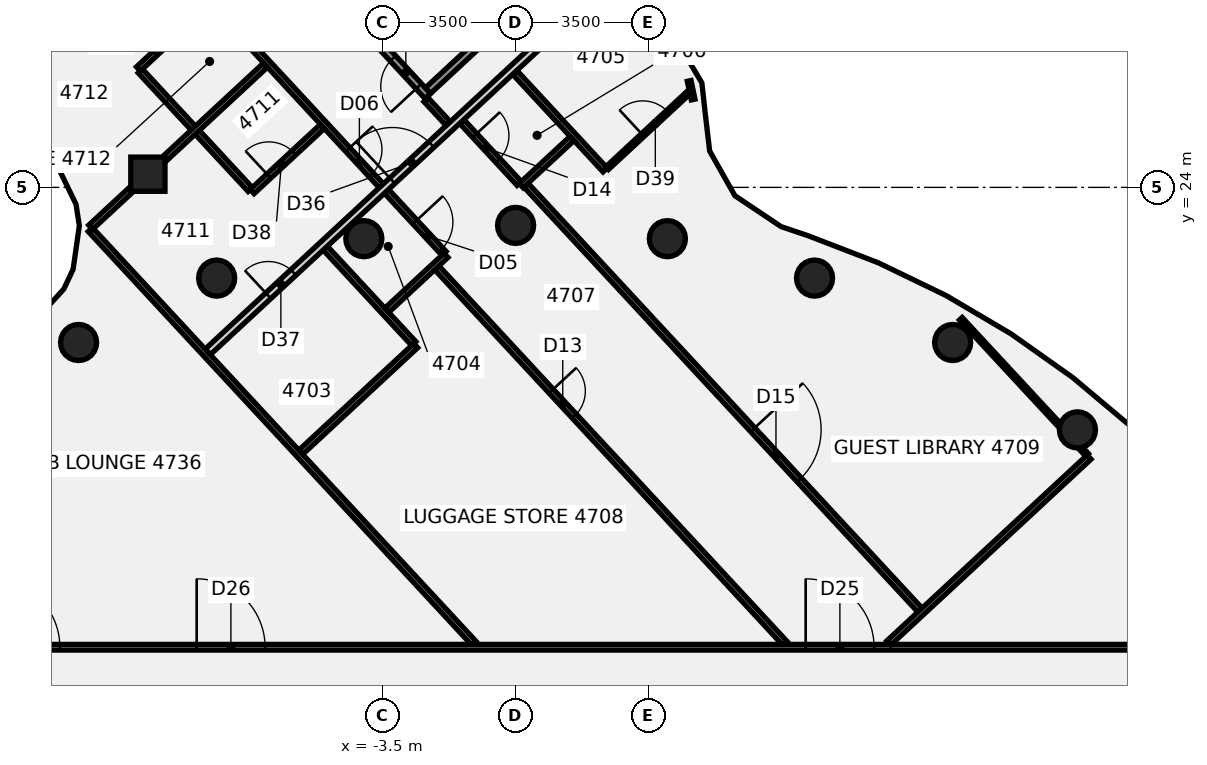
"""IFC4 building model, lengths in metres.
Left out: names, types, materials, properties, quantities, classifications, styles, units other than length and angle.
Written with IfcOpenShell. Run it as: python <this file> out.ifc"""

import sys

from ifc_helpers import new_model, si_unit, direction, frame, frame_2d, origin, origin_2d, place, context, subcontext, project, spatial, rectangle, circle, extrude, element, fill, save


model = new_model("IFC4")
c1 = context("Model", 3, precision=1e-05, world=origin(), true_north=direction((0.0, 1.0)))
c2 = subcontext(c1, "Body", "Model", "MODEL_VIEW")
j1 = project(units=[si_unit("LENGTHUNIT", "METRE"), si_unit("PLANEANGLEUNIT", "RADIAN")], contexts=[c1])
p1 = place(None, origin())
s1 = spatial("IfcSite", under=j1, at=p1, CompositionType="ELEMENT")
p2 = place(p1, origin())
s2 = spatial("IfcBuilding", under=s1, at=p2, CompositionType="ELEMENT")
p3 = place(p2, frame((0.0, 0.0, 189.7)))
s3 = spatial("IfcBuildingStorey", under=s2, at=p3, CompositionType="ELEMENT", Elevation=189.7)
for number, where, z_axis, x_axis in (
    (1, (14.784, 17.619, -0.14), (0.0, 0.0, 1.0), (1.0, 0.0, 0.0)),
    (2, (11.5, 19.919, -0.14), (0.0, 0.0, 1.0), (1.0, 0.0, 0.0)),
    (3, (7.866, 21.613, -0.14), (0.0, 0.0, 1.0), (1.0, 0.0, 0.0)),
    (4, (3.994, 22.651, -0.14), (0.0, 0.0, 1.0), (1.0, 0.0, 0.0)),
    (5, (0.0, 23.0, -0.14), (0.0, 0.0, 1.0), (1.0, 0.0, 0.0)),
    (6, (-3.994, 22.651, -0.14), (0.0, 0.0, 1.0), (1.0, 0.0, 0.0)),
    (7, (-7.866, 21.613, -0.14), (0.0, 0.0, 1.0), (1.0, 0.0, 0.0)),
    (8, (-11.5, 19.919, -0.14), (0.0, 0.0, 1.0), (1.0, 0.0, 0.0)),
):
    element("IfcColumn", number, at=place(p3, frame(where, z_axis=z_axis, x_axis=x_axis)), inside=s3, PredefinedType="COLUMN", context=c2, shape_type="SweptSolid", body=[
        extrude(circle(Radius=0.475, at=origin_2d()), origin(), (0.0, 0.0, 1.0), 3.6),
    ])
p4 = place(p3, frame((-9.677, 24.347, -0.139), z_axis=(-0.011386986819, -0.049004711131, 0.99873363557), x_axis=(0.732712476675, 0.679260584893, 0.041683142108)))
e9 = element("IfcColumn", 9, at=p4, inside=s3, PredefinedType="COLUMN", context=c2, shape_type="SweptSolid", body=[
    extrude(rectangle(XDim=0.9, YDim=0.9, at=origin_2d()), origin(), (0.0, 0.0, 1.0), 3.602),
])
p5 = place(p3, frame((-9.874, 27.062, 0.0), z_axis=(0.0, 0.0, 1.0), x_axis=(0.679983920545, -0.73322702337, 0.0)))
e10 = element("IfcWall", 10, at=p5, inside=s3, PredefinedType="PARTITIONING", context=c2, shape_type="SweptSolid", body=[
    extrude(rectangle(XDim=4.251, YDim=0.15, at=frame_2d((2.125, 0.0))), origin(), (0.0, 0.0, 1.0), 2.864),
])
p6 = place(p3, frame((-12.588, 33.811, 0.0), z_axis=(0.0, 0.0, 1.0), x_axis=(0.6797793132, -0.733416720116, 0.0)))
e11 = element("IfcWall", 11, at=p6, inside=s3, PredefinedType="PARTITIONING", context=c2, shape_type="SweptSolid", body=[
    extrude(rectangle(XDim=15.744, YDim=0.15, at=frame_2d((7.872, 0.0))), origin(), (0.0, 0.0, 1.0), 2.864),
])
p7 = place(p6, frame((14.619, 0.0, 0.0)))
e12 = element("IfcOpeningElement", 12, at=p7, cuts=e11, PredefinedType="OPENING", context=c2, shape_type="SweptSolid", body=[
    extrude(rectangle(XDim=1.0, YDim=2.1, at=frame_2d((0.5, 1.05))), frame((0.0, 0.085, 0.0), z_axis=(0.0, -1.0, 0.0), x_axis=(1.0, 0.0, 0.0)), (0.0, 0.0, 1.0), 0.17),
])
p8 = place(p6, frame((12.02, 0.0, 0.0)))
e13 = element("IfcOpeningElement", 13, at=p8, cuts=e11, PredefinedType="OPENING", context=c2, shape_type="SweptSolid", body=[
    extrude(rectangle(XDim=0.9, YDim=2.1, at=frame_2d((0.45, 1.05))), frame((0.0, 0.085, 0.0), z_axis=(0.0, -1.0, 0.0), x_axis=(1.0, 0.0, 0.0)), (0.0, 0.0, 1.0), 0.17),
])
p9 = place(p6, frame((5.32, 0.0, 0.0)))
e14 = element("IfcOpeningElement", 14, at=p9, cuts=e11, PredefinedType="OPENING", context=c2, shape_type="SweptSolid", body=[
    extrude(rectangle(XDim=0.9, YDim=2.1, at=frame_2d((0.45, 1.05))), frame((0.0, 0.085, 0.0), z_axis=(0.0, -1.0, 0.0), x_axis=(1.0, 0.0, 0.0)), (0.0, 0.0, 1.0), 0.17),
])
p10 = place(p6, frame((3.019, 0.0, 0.0)))
e15 = element("IfcOpeningElement", 15, at=p10, cuts=e11, PredefinedType="OPENING", context=c2, shape_type="SweptSolid", body=[
    extrude(rectangle(XDim=0.9, YDim=2.1, at=frame_2d((0.45, 1.05))), frame((0.0, 0.085, 0.0), z_axis=(0.0, -1.0, 0.0), x_axis=(1.0, 0.0, 0.0)), (0.0, 0.0, 1.0), 0.17),
])
p11 = place(p3, frame((-11.19, 22.89, 0.0), z_axis=(0.0, 0.0, 1.0), x_axis=(0.679949372444, -0.733259061255, 0.0)))
e16 = element("IfcWall", 16, at=p11, inside=s3, PredefinedType="PARTITIONING", context=c2, shape_type="SweptSolid", body=[
    extrude(rectangle(XDim=14.843, YDim=0.15, at=frame_2d((7.421, 0.0))), origin(), (0.0, 0.0, 1.0), 2.864),
])
p12 = place(p3, frame((-2.356, 26.306, 0.0), z_axis=(0.0, 0.0, 1.0), x_axis=(0.679848592059, -0.733352501785, 0.0)))
e17 = element("IfcWall", 17, at=p12, inside=s3, PredefinedType="PARTITIONING", context=c2, shape_type="SweptSolid", body=[
    extrude(rectangle(XDim=0.84, YDim=0.15, at=frame_2d((0.42, 0.0))), origin(), (0.0, 0.0, 1.0), 2.864),
])
p13 = place(p3, frame((-5.009, 22.402, 0.0), z_axis=(0.0, 0.0, 1.0), x_axis=(0.679947924825, -0.733260403627, 0.0)))
e18 = element("IfcWall", 18, at=p13, inside=s3, PredefinedType="PARTITIONING", context=c2, shape_type="SweptSolid", body=[
    extrude(rectangle(XDim=3.425, YDim=0.15, at=frame_2d((1.713, 0.0))), origin(), (0.0, 0.0, 1.0), 2.864),
])
p14 = place(p3, frame((-2.071, 21.88, 0.0), z_axis=(0.0, 0.0, 1.0), x_axis=(0.679904289686, -0.733300863811, 0.0)))
e19 = element("IfcWall", 19, at=p14, inside=s3, PredefinedType="PARTITIONING", context=c2, shape_type="SweptSolid", body=[
    extrude(rectangle(XDim=13.465, YDim=0.15, at=frame_2d((6.732, 0.0))), origin(), (0.0, 0.0, 1.0), 2.864),
])
p15 = place(p14, frame((4.42, 0.0, 0.0)))
e20 = element("IfcOpeningElement", 20, at=p15, cuts=e19, PredefinedType="OPENING", context=c2, shape_type="SweptSolid", body=[
    extrude(rectangle(XDim=0.9, YDim=2.1, at=frame_2d((0.45, 1.05))), frame((0.0, 0.085, 0.0), z_axis=(0.0, -1.0, 0.0), x_axis=(1.0, 0.0, 0.0)), (0.0, 0.0, 1.0), 0.17),
])
p16 = place(p3, frame((-1.416, 25.733, 0.0), z_axis=(0.0, 0.0, 1.0), x_axis=(0.679936338433, -0.733271147448, 0.0)))
e21 = element("IfcWall", 21, at=p16, inside=s3, PredefinedType="PARTITIONING", context=c2, shape_type="SweptSolid", body=[
    extrude(rectangle(XDim=2.22, YDim=0.15, at=frame_2d((1.11, 0.0))), origin(), (0.0, 0.0, 1.0), 2.864),
])
p17 = place(p16, frame((0.5, 0.0, 0.0)))
e22 = element("IfcOpeningElement", 22, at=p17, cuts=e21, PredefinedType="OPENING", context=c2, shape_type="SweptSolid", body=[
    extrude(rectangle(XDim=0.9, YDim=2.1, at=frame_2d((0.45, 1.05))), frame((0.0, 0.085, 0.0), z_axis=(0.0, -1.0, 0.0), x_axis=(1.0, 0.0, 0.0)), (0.0, 0.0, 1.0), 0.17),
])
p18 = place(p3, frame((-0.022, 27.025, 0.0), z_axis=(0.0, 0.0, 1.0), x_axis=(0.679701507536, -0.7334888279, 0.0)))
e23 = element("IfcWall", 23, at=p18, inside=s3, PredefinedType="PARTITIONING", context=c2, shape_type="SweptSolid", body=[
    extrude(rectangle(XDim=3.5, YDim=0.15, at=frame_2d((1.75, 0.0))), origin(), (0.0, 0.0, 1.0), 2.864),
])
p19 = place(p3, frame((0.276, 24.055, 0.0), z_axis=(0.0, 0.0, 1.0), x_axis=(0.67991262492, -0.733293135434, 0.0)))
e24 = element("IfcWall", 24, at=p19, inside=s3, PredefinedType="PARTITIONING", context=c2, shape_type="SweptSolid", body=[
    extrude(rectangle(XDim=15.239, YDim=0.15, at=frame_2d((7.62, 0.0))), origin(), (0.0, 0.0, 1.0), 2.864),
])
p20 = place(p19, frame((8.77, 0.0, 0.0)))
e25 = element("IfcOpeningElement", 25, at=p20, cuts=e24, PredefinedType="OPENING", context=c2, shape_type="SweptSolid", body=[
    extrude(rectangle(XDim=1.8, YDim=2.1, at=frame_2d((0.9, 1.05))), frame((0.0, 0.085, 0.0), z_axis=(0.0, -1.0, 0.0), x_axis=(1.0, 0.0, 0.0)), (0.0, 0.0, 1.0), 0.17),
])
p21 = place(p3, frame((11.715, 20.542, 0.0), z_axis=(0.0, 0.0, 1.0), x_axis=(0.679978080858, -0.733232438966, 0.0)))
e26 = element("IfcWall", 26, at=p21, inside=s3, PredefinedType="PARTITIONING", context=c2, shape_type="SweptSolid", body=[
    extrude(rectangle(XDim=3.842, YDim=0.1, at=frame_2d((1.921, 0.0))), origin(), (0.0, 0.0, 1.0), 2.864),
])
p22 = place(p3, frame((14.858, 17.154, 0.0), z_axis=(0.0, 0.0, 1.0), x_axis=(0.679849378898, -0.733351772352, 0.0)))
e27 = element("IfcWall", 27, at=p22, inside=s3, PredefinedType="PARTITIONING", context=c2, shape_type="SweptSolid", body=[
    extrude(rectangle(XDim=0.265, YDim=0.1, at=frame_2d((0.132, 0.0))), origin(), (0.0, 0.0, 1.0), 2.864),
])
p23 = place(p3, frame((-17.065, 11.9, 0.0), z_axis=(0.0, 0.0, 1.0), x_axis=(1.0, 0.0, 0.0)))
e28 = element("IfcWall", 28, at=p23, inside=s3, PredefinedType="PARTITIONING", context=c2, shape_type="SweptSolid", body=[
    extrude(rectangle(XDim=34.165, YDim=0.15, at=frame_2d((17.083, 0.0))), origin(), (0.0, 0.0, 1.0), 2.864),
])
p24 = place(p23, frame((24.698, 0.0, 0.0)))
e29 = element("IfcOpeningElement", 29, at=p24, cuts=e28, PredefinedType="OPENING", context=c2, shape_type="SweptSolid", body=[
    extrude(rectangle(XDim=1.8, YDim=2.1, at=frame_2d((0.9, 1.05))), frame((0.0, 0.085, 0.0), z_axis=(0.0, -1.0, 0.0), x_axis=(1.0, 0.0, 0.0)), (0.0, 0.0, 1.0), 0.17),
])
p25 = place(p23, frame((8.673, 0.0, 0.0)))
e30 = element("IfcOpeningElement", 30, at=p25, cuts=e28, PredefinedType="OPENING", context=c2, shape_type="SweptSolid", body=[
    extrude(rectangle(XDim=1.8, YDim=2.1, at=frame_2d((0.9, 1.05))), frame((0.0, 0.085, 0.0), z_axis=(0.0, -1.0, 0.0), x_axis=(1.0, 0.0, 0.0)), (0.0, 0.0, 1.0), 0.17),
])
p26 = place(p23, frame((3.273, 0.0, 0.0)))
e31 = element("IfcOpeningElement", 31, at=p26, cuts=e28, PredefinedType="OPENING", context=c2, shape_type="SweptSolid", body=[
    extrude(rectangle(XDim=1.8, YDim=2.1, at=frame_2d((0.9, 1.05))), frame((0.0, 0.085, 0.0), z_axis=(0.0, -1.0, 0.0), x_axis=(1.0, 0.0, 0.0)), (0.0, 0.0, 1.0), 0.17),
])
p27 = place(p3, frame((-13.64, 26.808, 0.0), z_axis=(0.0, 0.0, 1.0), x_axis=(0.733242994102, 0.67996669889, 0.0)))
e32 = element("IfcWall", 32, at=p27, inside=s3, PredefinedType="PARTITIONING", context=c2, shape_type="SweptSolid", body=[
    extrude(rectangle(XDim=5.453, YDim=0.15, at=frame_2d((2.727, 0.0))), origin(), (0.0, 0.0, 1.0), 2.864),
])
p28 = place(p3, frame((-11.181, 22.952, 0.0), z_axis=(0.0, 0.0, 1.0), x_axis=(0.733245156738, 0.679964366802, 0.0)))
e33 = element("IfcWall", 33, at=p28, inside=s3, PredefinedType="PARTITIONING", context=c2, shape_type="SweptSolid", body=[
    extrude(rectangle(XDim=1.443, YDim=0.15, at=frame_2d((0.722, 0.0))), origin(), (0.0, 0.0, 1.0), 2.864),
])
p29 = place(p3, frame((-9.343, 24.656, 0.0), z_axis=(0.0, 0.0, 1.0), x_axis=(0.733222895543, 0.679988371556, 0.0)))
e34 = element("IfcWall", 34, at=p29, inside=s3, PredefinedType="PARTITIONING", context=c2, shape_type="SweptSolid", body=[
    extrude(rectangle(XDim=3.765, YDim=0.15, at=frame_2d((1.883, 0.0))), origin(), (0.0, 0.0, 1.0), 2.864),
])
p30 = place(p3, frame((-9.926, 27.116, 0.0), z_axis=(0.0, 0.0, 1.0), x_axis=(0.733334885153, 0.679867594623, 0.0)))
e35 = element("IfcWall", 35, at=p30, inside=s3, PredefinedType="PARTITIONING", context=c2, shape_type="SweptSolid", body=[
    extrude(rectangle(XDim=2.521, YDim=0.15, at=frame_2d((1.26, 0.0))), origin(), (0.0, 0.0, 1.0), 2.864),
])
p31 = place(p30, frame((0.6, 0.0, 0.0)))
e36 = element("IfcOpeningElement", 36, at=p31, cuts=e35, PredefinedType="OPENING", context=c2, shape_type="SweptSolid", body=[
    extrude(rectangle(XDim=0.9, YDim=2.1, at=frame_2d((0.45, 1.05))), frame((0.0, 0.085, 0.0), z_axis=(0.0, -1.0, 0.0), x_axis=(1.0, 0.0, 0.0)), (0.0, 0.0, 1.0), 0.17),
])
p32 = place(p3, frame((-8.098, 19.673, 0.0), z_axis=(0.0, 0.0, 1.0), x_axis=(0.733267845556, 0.67993989931, 0.0)))
e37 = element("IfcWall", 37, at=p32, inside=s3, PredefinedType="PARTITIONING", context=c2, shape_type="SweptSolid", body=[
    extrude(rectangle(XDim=14.219, YDim=0.2, at=frame_2d((7.11, 0.0))), origin(), (0.0, 0.0, 1.0), 2.864),
])
p33 = place(p32, frame((6.62, 0.0, 0.0)))
e38 = element("IfcOpeningElement", 38, at=p33, cuts=e37, PredefinedType="OPENING", context=c2, shape_type="SweptSolid", body=[
    extrude(rectangle(XDim=1.4, YDim=2.1, at=frame_2d((0.7, 1.05))), frame((0.0, 0.11, 0.0), z_axis=(0.0, -1.0, 0.0), x_axis=(1.0, 0.0, 0.0)), (0.0, 0.0, 1.0), 0.22),
])
p34 = place(p32, frame((2.17, 0.0, 0.0)))
e39 = element("IfcOpeningElement", 39, at=p34, cuts=e37, PredefinedType="OPENING", context=c2, shape_type="SweptSolid", body=[
    extrude(rectangle(XDim=0.9, YDim=2.1, at=frame_2d((0.45, 1.05))), frame((0.0, 0.11, 0.0), z_axis=(0.0, -1.0, 0.0), x_axis=(1.0, 0.0, 0.0)), (0.0, 0.0, 1.0), 0.22),
])
p35 = place(p3, frame((-6.934, 23.889, 0.0), z_axis=(0.0, 0.0, 1.0), x_axis=(0.733334885153, 0.679867594623, 0.0)))
e40 = element("IfcWall", 40, at=p35, inside=s3, PredefinedType="PARTITIONING", context=c2, shape_type="SweptSolid", body=[
    extrude(rectangle(XDim=2.521, YDim=0.15, at=frame_2d((1.26, 0.0))), origin(), (0.0, 0.0, 1.0), 2.864),
])
p36 = place(p35, frame((0.6, 0.0, 0.0)))
e41 = element("IfcOpeningElement", 41, at=p36, cuts=e40, PredefinedType="OPENING", context=c2, shape_type="SweptSolid", body=[
    extrude(rectangle(XDim=0.9, YDim=2.1, at=frame_2d((0.45, 1.05))), frame((0.0, 0.085, 0.0), z_axis=(0.0, -1.0, 0.0), x_axis=(1.0, 0.0, 0.0)), (0.0, 0.0, 1.0), 0.17),
])
p37 = place(p3, frame((-5.65, 17.033, 0.0), z_axis=(0.0, 0.0, 1.0), x_axis=(0.733295549229, 0.679910021607, 0.0)))
e42 = element("IfcWall", 42, at=p37, inside=s3, PredefinedType="PARTITIONING", context=c2, shape_type="SweptSolid", body=[
    extrude(rectangle(XDim=4.12, YDim=0.15, at=frame_2d((2.06, 0.0))), origin(), (0.0, 0.0, 1.0), 2.864),
])
p38 = place(p3, frame((2.412, 24.509, 0.0), z_axis=(0.0, 0.0, 1.0), x_axis=(0.733258356223, 0.679950132752, 0.0)))
e43 = element("IfcWall", 43, at=p38, inside=s3, PredefinedType="PARTITIONING", context=c2, shape_type="SweptSolid", body=[
    extrude(rectangle(XDim=2.936, YDim=0.1, at=frame_2d((1.468, 0.0))), origin(), (0.0, 0.0, 1.0), 2.864),
])
p39 = place(p38, frame((1.275, 0.0, 0.0)))
e44 = element("IfcOpeningElement", 44, at=p39, cuts=e43, PredefinedType="OPENING", context=c2, shape_type="SweptSolid", body=[
    extrude(rectangle(XDim=0.9, YDim=2.1, at=frame_2d((0.45, 1.05))), frame((0.0, 0.06, 0.0), z_axis=(0.0, -1.0, 0.0), x_axis=(1.0, 0.0, 0.0)), (0.0, 0.0, 1.0), 0.12),
])
p40 = place(p3, frame((-3.386, 20.769, 0.0), z_axis=(0.0, 0.0, 1.0), x_axis=(0.733265024859, 0.679942941223, 0.0)))
e45 = element("IfcWall", 45, at=p40, inside=s3, PredefinedType="PARTITIONING", context=c2, shape_type="SweptSolid", body=[
    extrude(rectangle(XDim=2.12, YDim=0.15, at=frame_2d((1.06, 0.0))), origin(), (0.0, 0.0, 1.0), 2.864),
])
p41 = place(p3, frame((0.148, 24.046, 0.0), z_axis=(0.0, 0.0, 1.0), x_axis=(0.733299775598, 0.679905463361, 0.0)))
e46 = element("IfcWall", 46, at=p41, inside=s3, PredefinedType="PARTITIONING", context=c2, shape_type="SweptSolid", body=[
    extrude(rectangle(XDim=1.82, YDim=0.15, at=frame_2d((0.91, 0.0))), origin(), (0.0, 0.0, 1.0), 2.864),
])
p42 = place(p3, frame((9.819, 12.012, 0.0), z_axis=(0.0, 0.0, 1.0), x_axis=(0.733159805049, 0.680056394912, 0.0)))
e47 = element("IfcWall", 47, at=p42, inside=s3, PredefinedType="PARTITIONING", context=c2, shape_type="SweptSolid", body=[
    extrude(rectangle(XDim=7.19, YDim=0.15, at=frame_2d((3.595, 0.0))), origin(), (0.0, 0.0, 1.0), 2.864),
])
p43 = place(p3, frame((4.671, 26.312, 0.0), z_axis=(0.0, 0.0, 1.0), x_axis=(-0.207093447058, 0.978321166175, 0.0)))
e48 = element("IfcWall", 48, at=p43, inside=s3, PredefinedType="PARTITIONING", context=c2, shape_type="SweptSolid", body=[
    extrude(rectangle(XDim=0.5, YDim=0.1, at=frame_2d((0.25, 0.0))), origin(), (0.0, 0.0, 1.0), 2.864),
])
p44 = place(p3, frame((-2.31, 26.404, -0.14), z_axis=(0.0, 0.0, 1.0), x_axis=(-0.679911421173, 0.733294251551, 0.0)))
e49 = element("IfcWall", 49, at=p44, inside=s3, PredefinedType="SHEAR", context=c2, shape_type="SweptSolid", body=[
    extrude(rectangle(XDim=6.7, YDim=0.2, at=frame_2d((3.35, 0.0))), origin(), (0.0, 0.0, 1.0), 3.004),
])
p45 = place(p44, frame((0.35, 0.0, 0.0)))
e50 = element("IfcOpeningElement", 50, at=p45, cuts=e49, PredefinedType="OPENING", context=c2, shape_type="SweptSolid", body=[
    extrude(rectangle(XDim=1.0, YDim=2.1, at=frame_2d((0.5, 1.05))), frame((0.0, 0.11, 0.0), z_axis=(0.0, -1.0, 0.0), x_axis=(1.0, 0.0, 0.0)), (0.0, 0.0, 1.0), 0.22),
])
p46 = place(p3, frame((0.042, 28.721, -0.14), z_axis=(0.0, 0.0, 1.0), x_axis=(-0.733268848454, -0.679938817753, 0.0)))
e51 = element("IfcWall", 51, at=p46, inside=s3, PredefinedType="SHEAR", context=c2, shape_type="SweptSolid", body=[
    extrude(rectangle(XDim=3.2, YDim=0.2, at=frame_2d((1.6, 0.0))), origin(), (0.0, 0.0, 1.0), 3.004),
])
p47 = place(p7, frame((1.0, 0.0, 0.0), z_axis=(0.0, 0.0, 1.0), x_axis=(-1.0, 0.0, 0.0)))
e52 = element("IfcDoor", 52, at=p47, inside=s3, OperationType="SINGLE_SWING_RIGHT", PredefinedType="DOOR", context=c2, shape_type="SweptSolid", body=[
    extrude(rectangle(XDim=1.0, YDim=2.1, at=frame_2d((0.5, 1.05))), frame((0.0, 0.025, 0.0), z_axis=(0.0, -1.0, 0.0), x_axis=(1.0, 0.0, 0.0)), (0.0, 0.0, 1.0), 0.05),
])
fill(e12, e52)
p48 = place(p8, frame((0.9, 0.0, 0.0), z_axis=(0.0, 0.0, 1.0), x_axis=(-1.0, 0.0, 0.0)))
e53 = element("IfcDoor", 53, at=p48, inside=s3, OperationType="SINGLE_SWING_RIGHT", PredefinedType="DOOR", context=c2, shape_type="SweptSolid", body=[
    extrude(rectangle(XDim=0.9, YDim=2.1, at=frame_2d((0.45, 1.05))), frame((0.0, 0.025, 0.0), z_axis=(0.0, -1.0, 0.0), x_axis=(1.0, 0.0, 0.0)), (0.0, 0.0, 1.0), 0.05),
])
fill(e13, e53)
p49 = place(p15, frame((0.9, 0.0, 0.0), z_axis=(0.0, 0.0, 1.0), x_axis=(-1.0, 0.0, 0.0)))
e54 = element("IfcDoor", 54, at=p49, inside=s3, OperationType="SINGLE_SWING_LEFT", PredefinedType="DOOR", context=c2, shape_type="SweptSolid", body=[
    extrude(rectangle(XDim=0.9, YDim=2.1, at=frame_2d((0.45, 1.05))), frame((0.0, 0.025, 0.0), z_axis=(0.0, -1.0, 0.0), x_axis=(1.0, 0.0, 0.0)), (0.0, 0.0, 1.0), 0.05),
])
fill(e20, e54)
p50 = place(p17, origin())
e55 = element("IfcDoor", 55, at=p50, inside=s3, OperationType="SINGLE_SWING_RIGHT", PredefinedType="DOOR", context=c2, shape_type="SweptSolid", body=[
    extrude(rectangle(XDim=0.9, YDim=2.1, at=frame_2d((0.45, 1.05))), frame((0.0, 0.025, 0.0), z_axis=(0.0, -1.0, 0.0), x_axis=(1.0, 0.0, 0.0)), (0.0, 0.0, 1.0), 0.05),
])
fill(e22, e55)
p51 = place(p20, origin())
e56 = element("IfcDoor", 56, at=p51, inside=s3, OperationType="DOUBLE_DOOR_SINGLE_SWING", PredefinedType="DOOR", context=c2, shape_type="SweptSolid", body=[
    extrude(rectangle(XDim=1.8, YDim=2.1, at=frame_2d((0.9, 1.05))), frame((0.0, 0.025, 0.0), z_axis=(0.0, -1.0, 0.0), x_axis=(1.0, 0.0, 0.0)), (0.0, 0.0, 1.0), 0.05),
])
fill(e25, e56)
p52 = place(p24, frame((1.8, 0.0, 0.0), z_axis=(0.0, 0.0, 1.0), x_axis=(-1.0, 0.0, 0.0)))
e57 = element("IfcDoor", 57, at=p52, inside=s3, OperationType="DOUBLE_DOOR_SINGLE_SWING", PredefinedType="DOOR", context=c2, shape_type="SweptSolid", body=[
    extrude(rectangle(XDim=1.8, YDim=2.1, at=frame_2d((0.9, 1.05))), frame((0.0, 0.025, 0.0), z_axis=(0.0, -1.0, 0.0), x_axis=(1.0, 0.0, 0.0)), (0.0, 0.0, 1.0), 0.05),
])
fill(e29, e57)
p53 = place(p25, origin())
e58 = element("IfcDoor", 58, at=p53, inside=s3, OperationType="DOUBLE_DOOR_SINGLE_SWING", PredefinedType="DOOR", context=c2, shape_type="SweptSolid", body=[
    extrude(rectangle(XDim=1.8, YDim=2.1, at=frame_2d((0.9, 1.05))), frame((0.0, 0.025, 0.0), z_axis=(0.0, -1.0, 0.0), x_axis=(1.0, 0.0, 0.0)), (0.0, 0.0, 1.0), 0.05),
])
fill(e30, e58)
p54 = place(p26, origin())
e59 = element("IfcDoor", 59, at=p54, inside=s3, OperationType="DOUBLE_DOOR_SINGLE_SWING", PredefinedType="DOOR", context=c2, shape_type="SweptSolid", body=[
    extrude(rectangle(XDim=1.8, YDim=2.1, at=frame_2d((0.9, 1.05))), frame((0.0, 0.025, 0.0), z_axis=(0.0, -1.0, 0.0), x_axis=(1.0, 0.0, 0.0)), (0.0, 0.0, 1.0), 0.05),
])
fill(e31, e59)
p55 = place(p31, frame((0.9, 0.0, 0.0), z_axis=(0.0, 0.0, 1.0), x_axis=(-1.0, 0.0, 0.0)))
e60 = element("IfcDoor", 60, at=p55, inside=s3, OperationType="SINGLE_SWING_LEFT", PredefinedType="DOOR", context=c2, shape_type="SweptSolid", body=[
    extrude(rectangle(XDim=0.9, YDim=2.1, at=frame_2d((0.45, 1.05))), frame((0.0, 0.025, 0.0), z_axis=(0.0, -1.0, 0.0), x_axis=(1.0, 0.0, 0.0)), (0.0, 0.0, 1.0), 0.05),
])
fill(e36, e60)
p56 = place(p33, frame((1.4, 0.0, 0.0), z_axis=(0.0, 0.0, 1.0), x_axis=(-1.0, 0.0, 0.0)))
e61 = element("IfcDoor", 61, at=p56, inside=s3, OperationType="DOUBLE_DOOR_SINGLE_SWING", PredefinedType="DOOR", context=c2, shape_type="SweptSolid", body=[
    extrude(rectangle(XDim=1.4, YDim=2.1, at=frame_2d((0.7, 1.05))), frame((0.0, 0.025, 0.0), z_axis=(0.0, -1.0, 0.0), x_axis=(1.0, 0.0, 0.0)), (0.0, 0.0, 1.0), 0.05),
])
fill(e38, e61)
p57 = place(p34, frame((0.9, 0.0, 0.0), z_axis=(0.0, 0.0, 1.0), x_axis=(-1.0, 0.0, 0.0)))
e62 = element("IfcDoor", 62, at=p57, inside=s3, OperationType="SINGLE_SWING_LEFT", PredefinedType="DOOR", context=c2, shape_type="SweptSolid", body=[
    extrude(rectangle(XDim=0.9, YDim=2.1, at=frame_2d((0.45, 1.05))), frame((0.0, 0.025, 0.0), z_axis=(0.0, -1.0, 0.0), x_axis=(1.0, 0.0, 0.0)), (0.0, 0.0, 1.0), 0.05),
])
fill(e39, e62)
p58 = place(p36, origin())
e63 = element("IfcDoor", 63, at=p58, inside=s3, OperationType="SINGLE_SWING_RIGHT", PredefinedType="DOOR", context=c2, shape_type="SweptSolid", body=[
    extrude(rectangle(XDim=0.9, YDim=2.1, at=frame_2d((0.45, 1.05))), frame((0.0, 0.025, 0.0), z_axis=(0.0, -1.0, 0.0), x_axis=(1.0, 0.0, 0.0)), (0.0, 0.0, 1.0), 0.05),
])
fill(e41, e63)
p59 = place(p39, origin())
e64 = element("IfcDoor", 64, at=p59, inside=s3, OperationType="SINGLE_SWING_LEFT", PredefinedType="DOOR", context=c2, shape_type="SweptSolid", body=[
    extrude(rectangle(XDim=0.9, YDim=2.1, at=frame_2d((0.45, 1.05))), frame((0.0, 0.025, 0.0), z_axis=(0.0, -1.0, 0.0), x_axis=(1.0, 0.0, 0.0)), (0.0, 0.0, 1.0), 0.05),
])
fill(e44, e64)
p60 = place(p45, origin())
e65 = element("IfcDoor", 65, at=p60, inside=s3, OperationType="SINGLE_SWING_LEFT", PredefinedType="DOOR", context=c2, shape_type="SweptSolid", body=[
    extrude(rectangle(XDim=1.0, YDim=2.1, at=frame_2d((0.5, 1.05))), frame((0.0, 0.025, 0.0), z_axis=(0.0, -1.0, 0.0), x_axis=(1.0, 0.0, 0.0)), (0.0, 0.0, 1.0), 0.05),
])
fill(e50, e65)
save(model, sys.argv[1])
